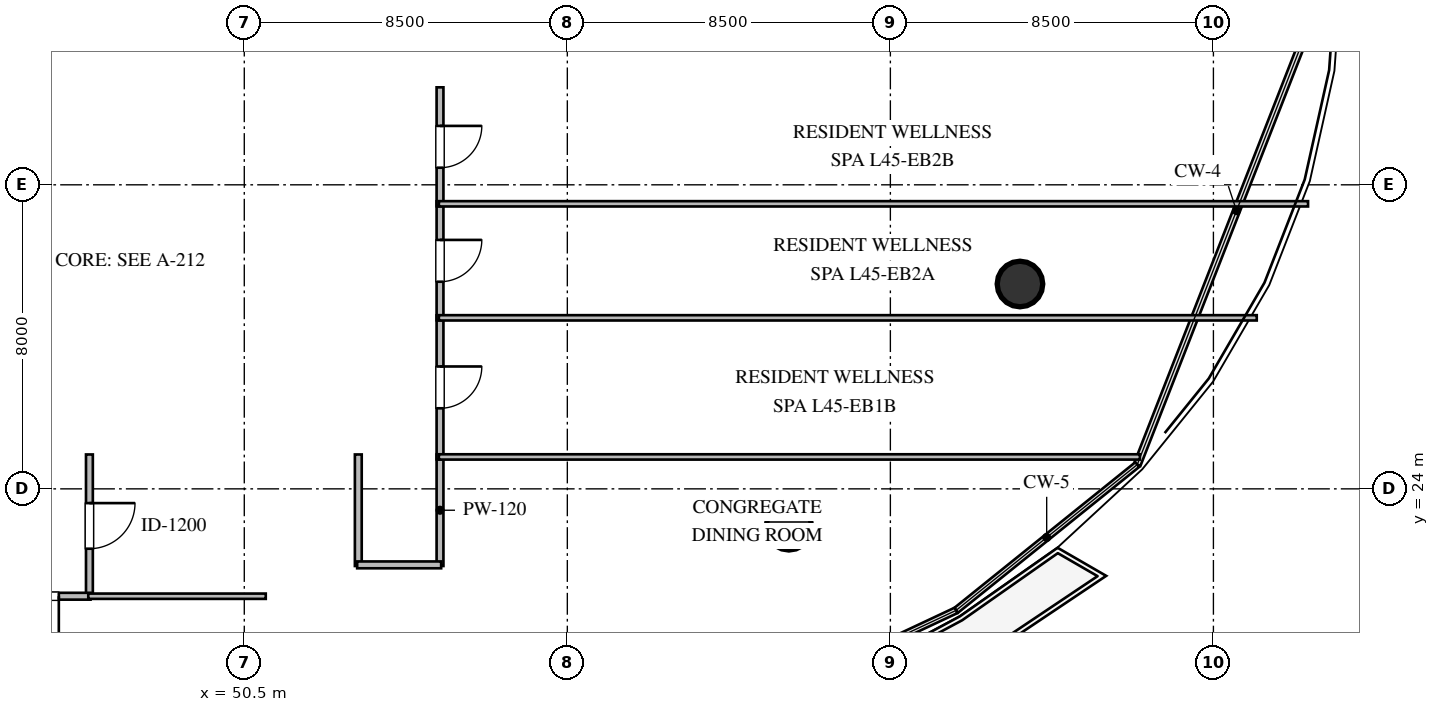
"""IFC4 building model, lengths in metres.
Left out: names, types, materials, properties, quantities, classifications, styles, units other than length and angle.
Written with IfcOpenShell. Run it as: python <this file> out.ifc"""

import sys

from ifc_helpers import new_model, si_unit, direction, frame, frame_2d, origin, origin_2d, place, context, subcontext, project, spatial, rectangle, circle, extrude, element, fill, save


model = new_model("IFC4")
c1 = context("Model", 3, precision=1e-05, world=origin(), true_north=direction((0.0, 1.0)))
c2 = subcontext(c1, "Body", "Model", "MODEL_VIEW")
j1 = project(units=[si_unit("LENGTHUNIT", "METRE"), si_unit("PLANEANGLEUNIT", "RADIAN")], contexts=[c1])
p1 = place(None, origin())
s1 = spatial("IfcSite", under=j1, at=p1, CompositionType="ELEMENT")
p2 = place(p1, origin())
s2 = spatial("IfcBuilding", under=s1, at=p2, CompositionType="ELEMENT")
p3 = place(p2, frame((0.0, 0.0, 171.0)))
s3 = spatial("IfcBuildingStorey", under=s2, at=p3, CompositionType="ELEMENT", Elevation=171.0)
for number, where, z_axis, x_axis in (
    (1, (64.83, 22.99, 0.0), (0.0, 0.0, 1.0), (1.0, 0.0, 0.0)),
    (2, (70.91, 29.39, 0.0), (0.0, 0.0, 1.0), (1.0, 0.0, 0.0)),
):
    element("IfcColumn", number, at=place(p3, frame(where, z_axis=z_axis, x_axis=x_axis)), inside=s3, PredefinedType="COLUMN", context=c2, shape_type="SweptSolid", body=[
        extrude(circle(Radius=0.6, at=origin_2d()), origin(), (0.0, 0.0, 1.0), 3.6),
    ])
p4 = place(p3, frame((46.425, 24.905, 0.0), z_axis=(0.0, 0.0, 1.0), x_axis=(0.0, -1.0, 0.0)))
e3 = element("IfcWall", 3, at=p4, inside=s3, PredefinedType="PARTITIONING", context=c2, shape_type="SweptSolid", body=[
    extrude(rectangle(XDim=3.76, YDim=0.18, at=frame_2d((1.88, 0.0))), origin(), (0.0, 0.0, 1.0), 3.36),
])
p5 = place(p4, frame((1.28, 0.0, 0.0)))
e4 = element("IfcOpeningElement", 4, at=p5, cuts=e3, PredefinedType="OPENING", context=c2, shape_type="SweptSolid", body=[
    extrude(rectangle(XDim=1.2, YDim=2.15, at=frame_2d((0.6, 1.075))), frame((0.0, 0.1, 0.0), z_axis=(0.0, -1.0, 0.0), x_axis=(1.0, 0.0, 0.0)), (0.0, 0.0, 1.0), 0.2),
])
for number, where, z_axis, x_axis in (
    (5, (55.65, 24.905, 0.0), (0.0, 0.0, 1.0), (0.0, -1.0, 0.0)),
    (6, (53.5, 21.97, 0.0), (0.0, 0.0, 1.0), (0.0, 1.0, 0.0)),
):
    element("IfcWall", number, at=place(p3, frame(where, z_axis=z_axis, x_axis=x_axis)), inside=s3, PredefinedType="PARTITIONING", context=c2, shape_type="SweptSolid", body=[
        extrude(rectangle(XDim=2.935, YDim=0.18, at=frame_2d((1.468, 0.0))), origin(), (0.0, 0.0, 1.0), 3.36),
    ])
p6 = place(p3, frame((55.68, 22.0, 0.0), z_axis=(0.0, 0.0, 1.0), x_axis=(-1.0, 0.0, 0.0)))
e7 = element("IfcWall", 7, at=p6, inside=s3, PredefinedType="PARTITIONING", context=c2, shape_type="SweptSolid", body=[
    extrude(rectangle(XDim=2.21, YDim=0.18, at=frame_2d((1.105, 0.0))), origin(), (0.0, 0.0, 1.0), 3.36),
])
p7 = place(p3, frame((55.65, 28.565, 0.0), z_axis=(0.0, 0.0, 1.0), x_axis=(0.0, -1.0, 0.0)))
e8 = element("IfcWall", 8, at=p7, inside=s3, PredefinedType="PARTITIONING", context=c2, shape_type="SweptSolid", body=[
    extrude(rectangle(XDim=3.79, YDim=0.18, at=frame_2d((1.895, 0.0))), origin(), (0.0, 0.0, 1.0), 3.36),
])
p8 = place(p7, frame((1.345, 0.0, 0.0)))
e9 = element("IfcOpeningElement", 9, at=p8, cuts=e8, PredefinedType="OPENING", context=c2, shape_type="SweptSolid", body=[
    extrude(rectangle(XDim=1.1, YDim=2.1, at=frame_2d((0.55, 1.05))), frame((0.0, 0.1, 0.0), z_axis=(0.0, -1.0, 0.0), x_axis=(1.0, 0.0, 0.0)), (0.0, 0.0, 1.0), 0.2),
])
p9 = place(p3, frame((55.65, 31.565, 0.0), z_axis=(0.0, 0.0, 1.0), x_axis=(0.0, -1.0, 0.0)))
e10 = element("IfcWall", 10, at=p9, inside=s3, PredefinedType="PARTITIONING", context=c2, shape_type="SweptSolid", body=[
    extrude(rectangle(XDim=3.13, YDim=0.18, at=frame_2d((1.565, 0.0))), origin(), (0.0, 0.0, 1.0), 3.36),
])
p10 = place(p9, frame((1.015, 0.0, 0.0)))
e11 = element("IfcOpeningElement", 11, at=p10, cuts=e10, PredefinedType="OPENING", context=c2, shape_type="SweptSolid", body=[
    extrude(rectangle(XDim=1.1, YDim=2.1, at=frame_2d((0.55, 1.05))), frame((0.0, 0.1, 0.0), z_axis=(0.0, -1.0, 0.0), x_axis=(1.0, 0.0, 0.0)), (0.0, 0.0, 1.0), 0.2),
])
p11 = place(p3, frame((55.65, 34.565, 0.0), z_axis=(0.0, 0.0, 1.0), x_axis=(0.0, -1.0, 0.0)))
e12 = element("IfcWall", 12, at=p11, inside=s3, PredefinedType="PARTITIONING", context=c2, shape_type="SweptSolid", body=[
    extrude(rectangle(XDim=3.13, YDim=0.18, at=frame_2d((1.565, 0.0))), origin(), (0.0, 0.0, 1.0), 3.36),
])
p12 = place(p11, frame((1.015, 0.0, 0.0)))
e13 = element("IfcOpeningElement", 13, at=p12, cuts=e12, PredefinedType="OPENING", context=c2, shape_type="SweptSolid", body=[
    extrude(rectangle(XDim=1.1, YDim=2.1, at=frame_2d((0.55, 1.05))), frame((0.0, 0.1, 0.0), z_axis=(0.0, -1.0, 0.0), x_axis=(1.0, 0.0, 0.0)), (0.0, 0.0, 1.0), 0.2),
])
p13 = place(p3, frame((46.455, 21.175, 0.0), z_axis=(0.0, 0.0, 1.0), x_axis=(-1.0, 0.0, 0.0)))
e14 = element("IfcWall", 14, at=p13, inside=s3, PredefinedType="PARTITIONING", context=c2, shape_type="SweptSolid", body=[
    extrude(rectangle(XDim=2.77, YDim=0.18, at=frame_2d((1.385, 0.0))), origin(), (0.0, 0.0, 1.0), 2.996),
])
p14 = place(p13, frame((0.835, 0.0, 0.0)))
e15 = element("IfcOpeningElement", 15, at=p14, cuts=e14, PredefinedType="OPENING", context=c2, shape_type="SweptSolid", body=[
    extrude(rectangle(XDim=1.1, YDim=2.1, at=frame_2d((0.55, 1.05))), frame((0.0, 0.1, 0.0), z_axis=(0.0, -1.0, 0.0), x_axis=(1.0, 0.0, 0.0)), (0.0, 0.0, 1.0), 0.2),
])
p15 = place(p3, frame((55.62, 24.84, 0.0), z_axis=(0.0, 0.0, 1.0), x_axis=(1.0, 0.0, 0.0)))
e16 = element("IfcWall", 16, at=p15, inside=s3, PredefinedType="PARTITIONING", context=c2, shape_type="SweptSolid", body=[
    extrude(rectangle(XDim=18.445, YDim=0.14, at=frame_2d((9.222, 0.0))), origin(), (0.0, 0.0, 1.0), 3.36),
])
p16 = place(p3, frame((51.065, 21.175, 0.0), z_axis=(0.0, 0.0, 1.0), x_axis=(-1.0, 0.0, 0.0)))
e17 = element("IfcWall", 17, at=p16, inside=s3, PredefinedType="PARTITIONING", context=c2, shape_type="SweptSolid", body=[
    extrude(rectangle(XDim=4.67, YDim=0.14, at=frame_2d((2.335, 0.0))), origin(), (0.0, 0.0, 1.0), 2.996),
])
p17 = place(p3, frame((55.62, 28.5, 0.0), z_axis=(0.0, 0.0, 1.0), x_axis=(1.0, 0.0, 0.0)))
e18 = element("IfcWall", 18, at=p17, inside=s3, PredefinedType="PARTITIONING", context=c2, shape_type="SweptSolid", body=[
    extrude(rectangle(XDim=21.52, YDim=0.14, at=frame_2d((10.76, 0.0))), origin(), (0.0, 0.0, 1.0), 2.89),
])
p18 = place(p3, frame((55.62, 31.5, 0.0), z_axis=(0.0, 0.0, 1.0), x_axis=(1.0, 0.0, 0.0)))
e19 = element("IfcWall", 19, at=p18, inside=s3, PredefinedType="PARTITIONING", context=c2, shape_type="SweptSolid", body=[
    extrude(rectangle(XDim=22.87, YDim=0.14, at=frame_2d((11.435, 0.0))), origin(), (0.0, 0.0, 1.0), 3.36),
])
p19 = place(p5, origin())
e20 = element("IfcDoor", 20, at=p19, inside=s3, OperationType="SINGLE_SWING_LEFT", PredefinedType="DOOR", context=c2, shape_type="SweptSolid", body=[
    extrude(rectangle(XDim=1.2, YDim=2.15, at=frame_2d((0.6, 1.075))), frame((0.0, 0.025, 0.0), z_axis=(0.0, -1.0, 0.0), x_axis=(1.0, 0.0, 0.0)), (0.0, 0.0, 1.0), 0.05),
])
fill(e4, e20)
p20 = place(p8, origin())
e21 = element("IfcDoor", 21, at=p20, inside=s3, OperationType="SINGLE_SWING_LEFT", PredefinedType="DOOR", context=c2, shape_type="SweptSolid", body=[
    extrude(rectangle(XDim=1.1, YDim=2.1, at=frame_2d((0.55, 1.05))), frame((0.0, 0.025, 0.0), z_axis=(0.0, -1.0, 0.0), x_axis=(1.0, 0.0, 0.0)), (0.0, 0.0, 1.0), 0.05),
])
fill(e9, e21)
p21 = place(p10, origin())
e22 = element("IfcDoor", 22, at=p21, inside=s3, OperationType="SINGLE_SWING_LEFT", PredefinedType="DOOR", context=c2, shape_type="SweptSolid", body=[
    extrude(rectangle(XDim=1.1, YDim=2.1, at=frame_2d((0.55, 1.05))), frame((0.0, 0.025, 0.0), z_axis=(0.0, -1.0, 0.0), x_axis=(1.0, 0.0, 0.0)), (0.0, 0.0, 1.0), 0.05),
])
fill(e11, e22)
p22 = place(p12, origin())
e23 = element("IfcDoor", 23, at=p22, inside=s3, OperationType="SINGLE_SWING_LEFT", PredefinedType="DOOR", context=c2, shape_type="SweptSolid", body=[
    extrude(rectangle(XDim=1.1, YDim=2.1, at=frame_2d((0.55, 1.05))), frame((0.0, 0.025, 0.0), z_axis=(0.0, -1.0, 0.0), x_axis=(1.0, 0.0, 0.0)), (0.0, 0.0, 1.0), 0.05),
])
fill(e13, e23)
p23 = place(p14, origin())
e24 = element("IfcDoor", 24, at=p23, inside=s3, OperationType="SINGLE_SWING_LEFT", PredefinedType="DOOR", context=c2, shape_type="SweptSolid", body=[
    extrude(rectangle(XDim=1.1, YDim=2.1, at=frame_2d((0.55, 1.05))), frame((0.0, 0.025, 0.0), z_axis=(0.0, -1.0, 0.0), x_axis=(1.0, 0.0, 0.0)), (0.0, 0.0, 1.0), 0.05),
])
fill(e15, e24)
save(model, sys.argv[1])
